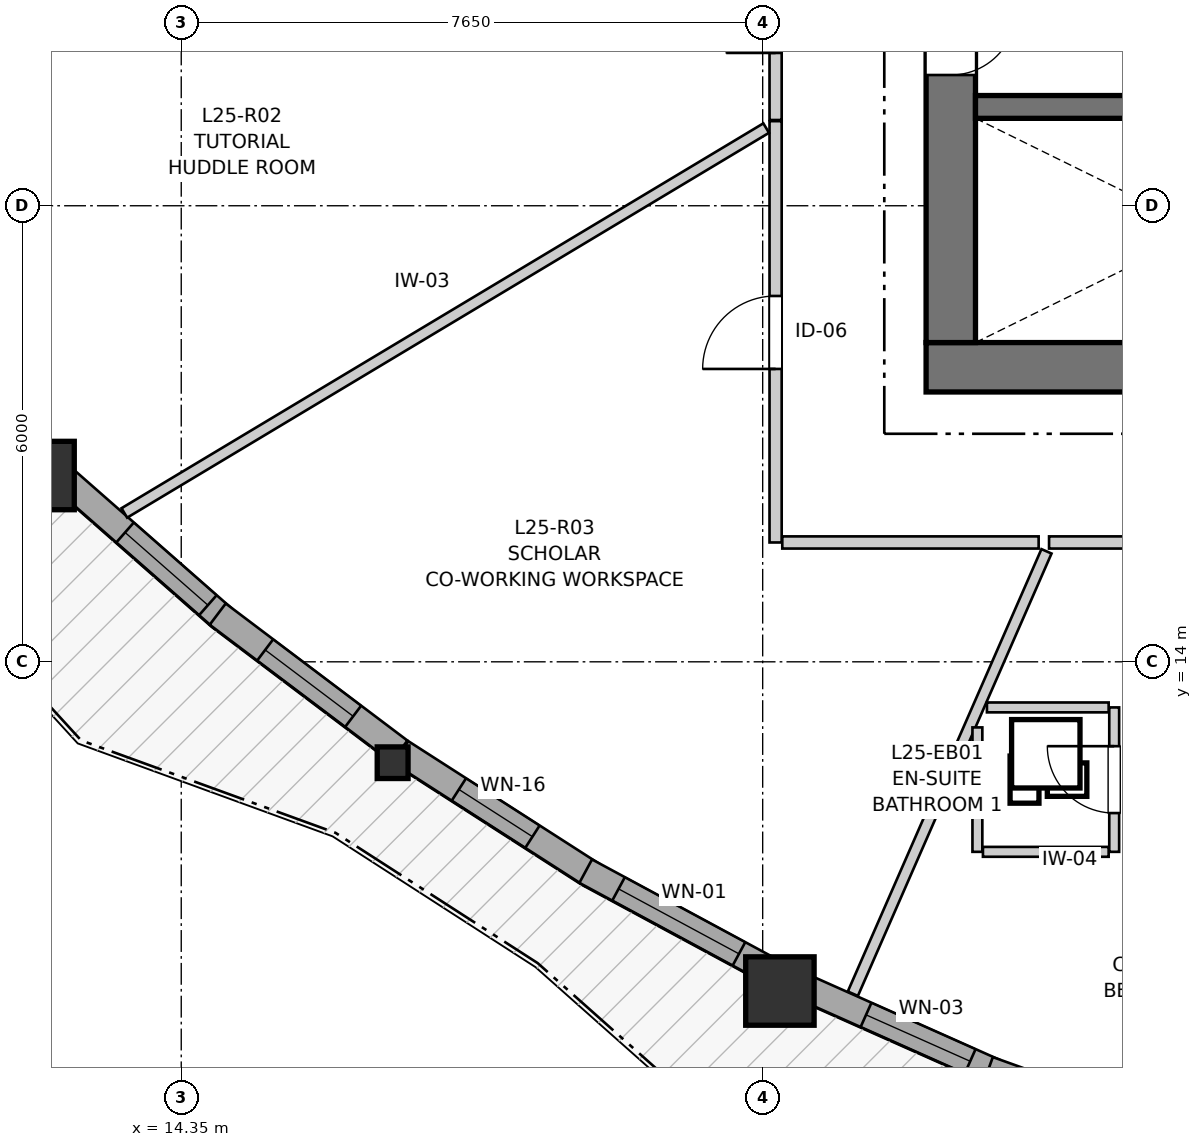
"""IFC4 building model, lengths in metres.
Left out: names, types, materials, properties, quantities, classifications, styles, units other than length and angle.
Written with IfcOpenShell. Run it as: python <this file> out.ifc"""

import sys

from ifc_helpers import new_model, si_unit, direction, frame, frame_2d, origin, origin_2d, place, context, subcontext, project, spatial, rectangle, i_section, extrude, source, transform, mapped, element, fill, save


model = new_model("IFC4")
c1 = context("Model", 3, precision=1e-05, world=origin(), true_north=direction((0.0, 1.0)))
c2 = subcontext(c1, "Body", "Model", "MODEL_VIEW")
j1 = project(units=[si_unit("LENGTHUNIT", "METRE"), si_unit("PLANEANGLEUNIT", "RADIAN")], contexts=[c1])
p1 = place(None, origin())
s1 = spatial("IfcSite", under=j1, at=p1, CompositionType="ELEMENT")
p2 = place(p1, origin())
s2 = spatial("IfcBuilding", under=s1, at=p2, CompositionType="ELEMENT")
p3 = place(p2, frame((0.0, 0.0, 86.4)))
s3 = spatial("IfcBuildingStorey", under=s2, at=p3, CompositionType="ELEMENT", Elevation=86.4)
p4 = place(p3, frame((24.15, 17.875, 0.0), z_axis=(0.0, 0.0, 1.0), x_axis=(1.0, 0.0, 0.0)))
e1 = element("IfcWall", 1, at=p4, inside=s3, PredefinedType="SHEAR", context=c2, shape_type="SweptSolid", body=[
    extrude(rectangle(XDim=12.4, YDim=0.65, at=frame_2d((6.2, 0.0))), origin(), (0.0, 0.0, 1.0), 2.95),
])
p5 = place(p3, frame((24.475, 33.8, 0.0), z_axis=(0.0, 0.0, 1.0), x_axis=(0.0, -1.0, 0.0)))
e2 = element("IfcWall", 2, at=p5, inside=s3, PredefinedType="SHEAR", context=c2, shape_type="SweptSolid", body=[
    extrude(rectangle(XDim=15.6, YDim=0.65, at=frame_2d((7.8, 0.0))), origin(), (0.0, 0.0, 1.0), 2.95),
])
p6 = place(p5, frame((7.05, 0.0, 0.0)))
e3 = element("IfcOpeningElement", 3, at=p6, cuts=e2, PredefinedType="OPENING", context=c2, shape_type="SweptSolid", body=[
    extrude(rectangle(XDim=1.5, YDim=2.15, at=frame_2d((0.75, 1.075))), frame((0.0, 0.335, 0.0), z_axis=(0.0, -1.0, 0.0), x_axis=(1.0, 0.0, 0.0)), (0.0, 0.0, 1.0), 0.67),
])
p7 = place(p5, frame((3.52, 0.0, 0.0)))
e4 = element("IfcOpeningElement", 4, at=p7, cuts=e2, PredefinedType="OPENING", context=c2, shape_type="SweptSolid", body=[
    extrude(rectangle(XDim=0.86, YDim=2.05, at=frame_2d((0.43, 1.025))), frame((0.0, 0.335, 0.0), z_axis=(0.0, -1.0, 0.0), x_axis=(1.0, 0.0, 0.0)), (0.0, 0.0, 1.0), 0.67),
])
p8 = place(p5, frame((11.22, 0.0, 0.0)))
e5 = element("IfcOpeningElement", 5, at=p8, cuts=e2, PredefinedType="OPENING", context=c2, shape_type="SweptSolid", body=[
    extrude(rectangle(XDim=0.86, YDim=2.05, at=frame_2d((0.43, 1.025))), frame((0.0, 0.335, 0.0), z_axis=(0.0, -1.0, 0.0), x_axis=(1.0, 0.0, 0.0)), (0.0, 0.0, 1.0), 0.67),
])
p9 = place(p3, frame((24.8, 21.3, 0.0), z_axis=(0.0, 0.0, 1.0), x_axis=(1.0, 0.0, 0.0)))
e6 = element("IfcWall", 6, at=p9, inside=s3, PredefinedType="SHEAR", context=c2, shape_type="SweptSolid", body=[
    extrude(rectangle(XDim=11.1, YDim=0.3, at=frame_2d((5.55, 0.0))), origin(), (0.0, 0.0, 1.0), 2.95),
])
p10 = place(p9, frame((6.22, 0.0, 0.0)))
e7 = element("IfcOpeningElement", 7, at=p10, cuts=e6, PredefinedType="OPENING", context=c2, shape_type="SweptSolid", body=[
    extrude(rectangle(XDim=0.98, YDim=2.15, at=frame_2d((0.49, 1.075))), frame((0.0, 0.16, 0.0), z_axis=(0.0, -1.0, 0.0), x_axis=(1.0, 0.0, 0.0)), (0.0, 0.0, 1.0), 0.32),
])
p11 = place(p9, frame((9.15, 0.0, 0.0)))
e8 = element("IfcOpeningElement", 8, at=p11, cuts=e6, PredefinedType="OPENING", context=c2, shape_type="SweptSolid", body=[
    extrude(rectangle(XDim=1.15, YDim=2.15, at=frame_2d((0.575, 1.075))), frame((0.0, 0.16, 0.0), z_axis=(0.0, -1.0, 0.0), x_axis=(1.0, 0.0, 0.0)), (0.0, 0.0, 1.0), 0.32),
])
m1 = source(origin(), c2, "Body", "SweptSolid", [
    extrude(rectangle(XDim=0.9, YDim=0.9, at=origin_2d()), origin(), (0.0, 0.0, 1.0), 2.95),
])
p12 = place(p3, frame((12.493, 16.451, 0.0), z_axis=(0.0, 0.0, 1.0), x_axis=(1.0, 0.0, 0.0)))
e9 = element("IfcColumn", 9, at=p12, inside=s3, PredefinedType="COLUMN", context=c2, shape_type="MappedRepresentation", body=[
    mapped(m1, transform((0.0, 0.0, 0.0), x_axis=(1.0, 0.0, 0.0), y_axis=(0.0, 1.0, 0.0), z_axis=(0.0, 0.0, 1.0), scale=1.0)),
])
m2 = source(origin(), c2, "Body", "SweptSolid", [
    extrude(i_section(OverallWidth=0.406, OverallDepth=0.416, WebThickness=0.027, FlangeThickness=0.044, FilletRadius=0.015, at=origin_2d()), origin(), (0.0, 0.0, 1.0), 2.95),
])
p13 = place(p3, frame((17.131, 12.673, 0.0), z_axis=(0.0, 0.0, 1.0), x_axis=(1.0, 0.0, 0.0)))
e10 = element("IfcColumn", 10, at=p13, inside=s3, PredefinedType="PILASTER", context=c2, shape_type="MappedRepresentation", body=[
    mapped(m2, transform((0.0, 0.0, 0.0), x_axis=(1.0, 0.0, 0.0), y_axis=(0.0, 1.0, 0.0), z_axis=(0.0, 0.0, 1.0), scale=1.0)),
])
p14 = place(p3, frame((22.227, 9.669, 0.0), z_axis=(0.0, 0.0, 1.0), x_axis=(1.0, 0.0, 0.0)))
e11 = element("IfcColumn", 11, at=p14, inside=s3, PredefinedType="COLUMN", context=c2, shape_type="MappedRepresentation", body=[
    mapped(m1, transform((0.0, 0.0, 0.0), x_axis=(1.0, 0.0, 0.0), y_axis=(0.0, 1.0, 0.0), z_axis=(0.0, 0.0, 1.0), scale=1.0)),
])
p15 = place(p3, frame((12.777, 16.434, 0.0), z_axis=(0.0, 0.0, 1.0), x_axis=(0.751531192513, -0.659697556976, 0.0)))
e12 = element("IfcWall", 12, at=p15, inside=s3, PredefinedType="SOLIDWALL", context=c2, shape_type="SweptSolid", body=[
    extrude(rectangle(XDim=2.823, YDim=0.35, at=frame_2d((1.412, 0.0))), origin(), (0.0, 0.0, 1.0), 2.48),
])
p16 = place(p15, frame((1.11, 0.0, 0.82)))
e13 = element("IfcOpeningElement", 13, at=p16, cuts=e12, PredefinedType="OPENING", context=c2, shape_type="SweptSolid", body=[
    extrude(rectangle(XDim=1.45, YDim=1.25, at=frame_2d((0.725, 0.625))), frame((0.0, 0.185, 0.0), z_axis=(0.0, -1.0, 0.0), x_axis=(1.0, 0.0, 0.0)), (0.0, 0.0, 1.0), 0.37),
])
p17 = place(p3, frame((14.83, 14.627, 0.0), z_axis=(0.0, 0.0, 1.0), x_axis=(0.798382892471, -0.602150111691, 0.0)))
e14 = element("IfcWall", 14, at=p17, inside=s3, PredefinedType="SOLIDWALL", context=c2, shape_type="SweptSolid", body=[
    extrude(rectangle(XDim=2.995, YDim=0.35, at=frame_2d((1.497, 0.0))), origin(), (0.0, 0.0, 1.0), 2.48),
])
p18 = place(p17, frame((0.782, 0.0, 0.82)))
e15 = element("IfcOpeningElement", 15, at=p18, cuts=e14, PredefinedType="OPENING", context=c2, shape_type="SweptSolid", body=[
    extrude(rectangle(XDim=1.45, YDim=1.25, at=frame_2d((0.725, 0.625))), frame((0.0, 0.185, 0.0), z_axis=(0.0, -1.0, 0.0), x_axis=(1.0, 0.0, 0.0)), (0.0, 0.0, 1.0), 0.37),
])
p19 = place(p3, frame((17.243, 12.809, 0.0), z_axis=(0.0, 0.0, 1.0), x_axis=(0.84150067635, -0.540256061236, 0.0)))
e16 = element("IfcWall", 16, at=p19, inside=s3, PredefinedType="SOLIDWALL", context=c2, shape_type="SweptSolid", body=[
    extrude(rectangle(XDim=2.978, YDim=0.35, at=frame_2d((1.489, 0.0))), origin(), (0.0, 0.0, 1.0), 2.48),
])
p20 = place(p19, frame((0.904, 0.0, 0.82)))
e17 = element("IfcOpeningElement", 17, at=p20, cuts=e16, PredefinedType="OPENING", context=c2, shape_type="SweptSolid", body=[
    extrude(rectangle(XDim=1.15, YDim=1.2, at=frame_2d((0.575, 0.6))), frame((0.0, 0.185, 0.0), z_axis=(0.0, -1.0, 0.0), x_axis=(1.0, 0.0, 0.0)), (0.0, 0.0, 1.0), 0.37),
])
p21 = place(p3, frame((19.671, 11.246, 0.0), z_axis=(0.0, 0.0, 1.0), x_axis=(0.880120285763, -0.474750758387, 0.0)))
e18 = element("IfcWall", 18, at=p21, inside=s3, PredefinedType="SOLIDWALL", context=c2, shape_type="SweptSolid", body=[
    extrude(rectangle(XDim=2.773, YDim=0.35, at=frame_2d((1.386, 0.0))), origin(), (0.0, 0.0, 1.0), 2.48),
])
p22 = place(p21, frame((0.491, 0.0, 0.82)))
e19 = element("IfcOpeningElement", 19, at=p22, cuts=e18, PredefinedType="OPENING", context=c2, shape_type="SweptSolid", body=[
    extrude(rectangle(XDim=1.8, YDim=1.45, at=frame_2d((0.9, 0.725))), frame((0.0, 0.185, 0.0), z_axis=(0.0, -1.0, 0.0), x_axis=(1.0, 0.0, 0.0)), (0.0, 0.0, 1.0), 0.37),
])
p23 = place(p3, frame((22.503, 9.737, 0.0), z_axis=(0.0, 0.0, 1.0), x_axis=(0.913443049169, -0.406966578388, 0.0)))
e20 = element("IfcWall", 20, at=p23, inside=s3, PredefinedType="SOLIDWALL", context=c2, shape_type="SweptSolid", body=[
    extrude(rectangle(XDim=2.79, YDim=0.35, at=frame_2d((1.395, 0.0))), origin(), (0.0, 0.0, 1.0), 2.48),
])
p24 = place(p23, frame((0.938, 0.0, 0.82)))
e21 = element("IfcOpeningElement", 21, at=p24, cuts=e20, PredefinedType="OPENING", context=c2, shape_type="SweptSolid", body=[
    extrude(rectangle(XDim=1.5, YDim=1.45, at=frame_2d((0.75, 0.725))), frame((0.0, 0.185, 0.0), z_axis=(0.0, -1.0, 0.0), x_axis=(1.0, 0.0, 0.0)), (0.0, 0.0, 1.0), 0.37),
])
p25 = place(p3, frame((24.969, 8.635, 0.0), z_axis=(0.0, 0.0, 1.0), x_axis=(0.941099972293, -0.338128440315, 0.0)))
e22 = element("IfcWall", 22, at=p25, inside=s3, PredefinedType="SOLIDWALL", context=c2, shape_type="SweptSolid", body=[
    extrude(rectangle(XDim=3.028, YDim=0.35, at=frame_2d((1.514, 0.0))), origin(), (0.0, 0.0, 1.0), 2.48),
])
p26 = place(p25, frame((0.774, 0.0, 0.82)))
e23 = element("IfcOpeningElement", 23, at=p26, cuts=e22, PredefinedType="OPENING", context=c2, shape_type="SweptSolid", body=[
    extrude(rectangle(XDim=1.5, YDim=1.45, at=frame_2d((0.75, 0.725))), frame((0.0, 0.185, 0.0), z_axis=(0.0, -1.0, 0.0), x_axis=(1.0, 0.0, 0.0)), (0.0, 0.0, 1.0), 0.37),
])
p27 = place(p3, frame((22.17, 15.57, 0.0), z_axis=(0.0, 0.0, 1.0), x_axis=(0.0, 1.0, 0.0)))
e24 = element("IfcWall", 24, at=p27, inside=s3, PredefinedType="PARTITIONING", context=c2, shape_type="SweptSolid", body=[
    extrude(rectangle(XDim=5.543, YDim=0.16, at=frame_2d((2.771, 0.0))), origin(), (0.0, 0.0, 1.0), 2.95),
])
p28 = place(p27, frame((2.283, 0.0, 0.0)))
e25 = element("IfcOpeningElement", 25, at=p28, cuts=e24, PredefinedType="OPENING", context=c2, shape_type="SweptSolid", body=[
    extrude(rectangle(XDim=0.96, YDim=2.1, at=frame_2d((0.48, 1.05))), frame((0.0, 0.09, 0.0), z_axis=(0.0, -1.0, 0.0), x_axis=(1.0, 0.0, 0.0)), (0.0, 0.0, 1.0), 0.18),
])
p29 = place(p3, frame((29.438, 15.57, 0.0), z_axis=(0.0, 0.0, 1.0), x_axis=(-1.0, 0.0, 0.0)))
e26 = element("IfcWall", 26, at=p29, inside=s3, PredefinedType="PARTITIONING", context=c2, shape_type="SweptSolid", body=[
    extrude(rectangle(XDim=3.67, YDim=0.16, at=frame_2d((1.835, 0.0))), origin(), (0.0, 0.0, 1.0), 2.95),
])
p30 = place(p29, frame((1.374, 0.0, 0.0)))
e27 = element("IfcOpeningElement", 27, at=p30, cuts=e26, PredefinedType="OPENING", context=c2, shape_type="SweptSolid", body=[
    extrude(rectangle(XDim=0.92, YDim=2.1, at=frame_2d((0.46, 1.05))), frame((0.0, 0.09, 0.0), z_axis=(0.0, -1.0, 0.0), x_axis=(1.0, 0.0, 0.0)), (0.0, 0.0, 1.0), 0.18),
])
p31 = place(p3, frame((22.17, 21.128, 0.0), z_axis=(0.0, 0.0, 1.0), x_axis=(0.0, 1.0, 0.0)))
e28 = element("IfcWall", 28, at=p31, inside=s3, PredefinedType="PARTITIONING", context=c2, shape_type="SweptSolid", body=[
    extrude(rectangle(XDim=3.022, YDim=0.16, at=frame_2d((1.511, 0.0))), origin(), (0.0, 0.0, 1.0), 2.95),
])
p32 = place(p31, frame((0.883, 0.0, 0.0)))
e29 = element("IfcOpeningElement", 29, at=p32, cuts=e28, PredefinedType="OPENING", context=c2, shape_type="SweptSolid", body=[
    extrude(rectangle(XDim=1.3, YDim=2.1, at=frame_2d((0.65, 1.05))), frame((0.0, 0.09, 0.0), z_axis=(0.0, -1.0, 0.0), x_axis=(1.0, 0.0, 0.0)), (0.0, 0.0, 1.0), 0.18),
])
p33 = place(p3, frame((26.625, 11.5, 0.0), z_axis=(0.0, 0.0, 1.0), x_axis=(0.0, 1.0, 0.0)))
e30 = element("IfcWall", 30, at=p33, inside=s3, PredefinedType="PARTITIONING", context=c2, shape_type="SweptSolid", body=[
    extrude(rectangle(XDim=1.9, YDim=0.13, at=frame_2d((0.95, 0.0))), origin(), (0.0, 0.0, 1.0), 2.95),
])
p34 = place(p33, frame((0.51, 0.0, 0.0)))
e31 = element("IfcOpeningElement", 31, at=p34, cuts=e30, PredefinedType="OPENING", context=c2, shape_type="SweptSolid", body=[
    extrude(rectangle(XDim=0.88, YDim=2.05, at=frame_2d((0.44, 1.025))), frame((0.0, 0.075, 0.0), z_axis=(0.0, -1.0, 0.0), x_axis=(1.0, 0.0, 0.0)), (0.0, 0.0, 1.0), 0.15),
])
p35 = place(p3, frame((13.601, 15.958, 0.0), z_axis=(0.0, 0.0, 1.0), x_axis=(0.857661345212, 0.514214952066, 0.0)))
e32 = element("IfcWall", 32, at=p35, inside=s3, PredefinedType="PARTITIONING", context=c2, shape_type="SweptSolid", body=[
    extrude(rectangle(XDim=9.846, YDim=0.145, at=frame_2d((4.923, 0.0))), origin(), (0.0, 0.0, 1.0), 2.95),
])
p36 = place(p3, frame((23.186, 9.634, 0.0), z_axis=(0.0, 0.0, 1.0), x_axis=(0.400994208685, 0.916080588486, 0.0)))
e33 = element("IfcWall", 33, at=p36, inside=s3, PredefinedType="PARTITIONING", context=c2, shape_type="SweptSolid", body=[
    extrude(rectangle(XDim=6.353, YDim=0.145, at=frame_2d((3.177, 0.0))), origin(), (0.0, 0.0, 1.0), 2.95),
])
p37 = place(p3, frame((22.258, 15.57, 0.0), z_axis=(0.0, 0.0, 1.0), x_axis=(1.0, 0.0, 0.0)))
e34 = element("IfcWall", 34, at=p37, inside=s3, PredefinedType="PARTITIONING", context=c2, shape_type="SweptSolid", body=[
    extrude(rectangle(XDim=3.373, YDim=0.16, at=frame_2d((1.687, 0.0))), origin(), (0.0, 0.0, 1.0), 2.95),
])
p38 = place(p3, frame((24.825, 11.5, 0.0), z_axis=(0.0, 0.0, 1.0), x_axis=(0.0, 1.0, 0.0)))
e35 = element("IfcWall", 35, at=p38, inside=s3, PredefinedType="PARTITIONING", context=c2, shape_type="SweptSolid", body=[
    extrude(rectangle(XDim=1.637, YDim=0.13, at=frame_2d((0.818, 0.0))), origin(), (0.0, 0.0, 1.0), 2.95),
])
p39 = place(p3, frame((24.898, 11.5, 0.0), z_axis=(0.0, 0.0, 1.0), x_axis=(1.0, 0.0, 0.0)))
e36 = element("IfcWall", 36, at=p39, inside=s3, PredefinedType="PARTITIONING", context=c2, shape_type="SweptSolid", body=[
    extrude(rectangle(XDim=1.654, YDim=0.13, at=frame_2d((0.827, 0.0))), origin(), (0.0, 0.0, 1.0), 2.558),
])
p40 = place(p3, frame((24.951, 13.4, 0.0), z_axis=(0.0, 0.0, 1.0), x_axis=(1.0, 0.0, 0.0)))
e37 = element("IfcWall", 37, at=p40, inside=s3, PredefinedType="PARTITIONING", context=c2, shape_type="SweptSolid", body=[
    extrude(rectangle(XDim=1.601, YDim=0.13, at=frame_2d((0.801, 0.0))), origin(), (0.0, 0.0, 1.0), 2.95),
])
m3 = source(origin(), c2, "Body", "SweptSolid", [
    extrude(rectangle(XDim=1.45, YDim=1.25, at=frame_2d((0.725, 0.625))), frame((0.0, 0.03, 0.0), z_axis=(0.0, -1.0, 0.0), x_axis=(1.0, 0.0, 0.0)), (0.0, 0.0, 1.0), 0.06),
])
p41 = place(p16, origin())
e38 = element("IfcWindow", 38, at=p41, inside=s3, PartitioningType="SINGLE_PANEL", PredefinedType="WINDOW", context=c2, shape_type="MappedRepresentation", body=[
    mapped(m3, transform((0.0, 0.0, 0.0), x_axis=(1.0, 0.0, 0.0), y_axis=(0.0, 1.0, 0.0), z_axis=(0.0, 0.0, 1.0), scale=1.0)),
])
fill(e13, e38)
p42 = place(p18, origin())
e39 = element("IfcWindow", 39, at=p42, inside=s3, PartitioningType="SINGLE_PANEL", PredefinedType="WINDOW", context=c2, shape_type="MappedRepresentation", body=[
    mapped(m3, transform((0.0, 0.0, 0.0), x_axis=(1.0, 0.0, 0.0), y_axis=(0.0, 1.0, 0.0), z_axis=(0.0, 0.0, 1.0), scale=1.0)),
])
fill(e15, e39)
m4 = source(origin(), c2, "Body", "SweptSolid", [
    extrude(rectangle(XDim=1.15, YDim=1.2, at=frame_2d((0.575, 0.6))), frame((0.0, 0.03, 0.0), z_axis=(0.0, -1.0, 0.0), x_axis=(1.0, 0.0, 0.0)), (0.0, 0.0, 1.0), 0.06),
])
p43 = place(p20, origin())
e40 = element("IfcWindow", 40, at=p43, inside=s3, PartitioningType="SINGLE_PANEL", PredefinedType="WINDOW", context=c2, shape_type="MappedRepresentation", body=[
    mapped(m4, transform((0.0, 0.0, 0.0), x_axis=(1.0, 0.0, 0.0), y_axis=(0.0, 1.0, 0.0), z_axis=(0.0, 0.0, 1.0), scale=1.0)),
])
fill(e17, e40)
m5 = source(origin(), c2, "Body", "SweptSolid", [
    extrude(rectangle(XDim=1.8, YDim=1.45, at=frame_2d((0.9, 0.725))), frame((0.0, 0.03, 0.0), z_axis=(0.0, -1.0, 0.0), x_axis=(1.0, 0.0, 0.0)), (0.0, 0.0, 1.0), 0.06),
])
p44 = place(p22, origin())
e41 = element("IfcWindow", 41, at=p44, inside=s3, PartitioningType="SINGLE_PANEL", PredefinedType="WINDOW", context=c2, shape_type="MappedRepresentation", body=[
    mapped(m5, transform((0.0, 0.0, 0.0), x_axis=(1.0, 0.0, 0.0), y_axis=(0.0, 1.0, 0.0), z_axis=(0.0, 0.0, 1.0), scale=1.0)),
])
fill(e19, e41)
m6 = source(origin(), c2, "Body", "SweptSolid", [
    extrude(rectangle(XDim=1.5, YDim=1.45, at=frame_2d((0.75, 0.725))), frame((0.0, 0.03, 0.0), z_axis=(0.0, -1.0, 0.0), x_axis=(1.0, 0.0, 0.0)), (0.0, 0.0, 1.0), 0.06),
])
p45 = place(p24, origin())
e42 = element("IfcWindow", 42, at=p45, inside=s3, PartitioningType="SINGLE_PANEL", PredefinedType="WINDOW", context=c2, shape_type="MappedRepresentation", body=[
    mapped(m6, transform((0.0, 0.0, 0.0), x_axis=(1.0, 0.0, 0.0), y_axis=(0.0, 1.0, 0.0), z_axis=(0.0, 0.0, 1.0), scale=1.0)),
])
fill(e21, e42)
m7 = source(origin(), c2, "Body", "SweptSolid", [
    extrude(rectangle(XDim=0.86, YDim=2.05, at=frame_2d((0.43, 1.025))), frame((0.0, 0.025, 0.0), z_axis=(0.0, -1.0, 0.0), x_axis=(1.0, 0.0, 0.0)), (0.0, 0.0, 1.0), 0.05),
])
p46 = place(p8, origin())
e43 = element("IfcDoor", 43, at=p46, inside=s3, OperationType="SINGLE_SWING_LEFT", PredefinedType="DOOR", context=c2, shape_type="MappedRepresentation", body=[
    mapped(m7, transform((0.0, 0.0, 0.0), x_axis=(1.0, 0.0, 0.0), y_axis=(0.0, 1.0, 0.0), z_axis=(0.0, 0.0, 1.0), scale=1.0)),
])
fill(e5, e43)
m8 = source(origin(), c2, "Body", "SweptSolid", [
    extrude(rectangle(XDim=0.96, YDim=2.1, at=frame_2d((0.48, 1.05))), frame((0.0, 0.025, 0.0), z_axis=(0.0, -1.0, 0.0), x_axis=(1.0, 0.0, 0.0)), (0.0, 0.0, 1.0), 0.05),
])
p47 = place(p28, origin())
e44 = element("IfcDoor", 44, at=p47, inside=s3, OperationType="SINGLE_SWING_LEFT", PredefinedType="DOOR", context=c2, shape_type="MappedRepresentation", body=[
    mapped(m8, transform((0.0, 0.0, 0.0), x_axis=(1.0, 0.0, 0.0), y_axis=(0.0, 1.0, 0.0), z_axis=(0.0, 0.0, 1.0), scale=1.0)),
])
fill(e25, e44)
m9 = source(origin(), c2, "Body", "SweptSolid", [
    extrude(rectangle(XDim=1.3, YDim=2.1, at=frame_2d((0.65, 1.05))), frame((0.0, 0.025, 0.0), z_axis=(0.0, -1.0, 0.0), x_axis=(1.0, 0.0, 0.0)), (0.0, 0.0, 1.0), 0.05),
])
p48 = place(p32, origin())
e45 = element("IfcDoor", 45, at=p48, inside=s3, OperationType="DOUBLE_DOOR_SINGLE_SWING", PredefinedType="DOOR", context=c2, shape_type="MappedRepresentation", body=[
    mapped(m9, transform((0.0, 0.0, 0.0), x_axis=(1.0, 0.0, 0.0), y_axis=(0.0, 1.0, 0.0), z_axis=(0.0, 0.0, 1.0), scale=1.0)),
])
fill(e29, e45)
m10 = source(origin(), c2, "Body", "SweptSolid", [
    extrude(rectangle(XDim=0.88, YDim=2.05, at=frame_2d((0.44, 1.025))), frame((0.0, 0.025, 0.0), z_axis=(0.0, -1.0, 0.0), x_axis=(1.0, 0.0, 0.0)), (0.0, 0.0, 1.0), 0.05),
])
p49 = place(p34, origin())
e46 = element("IfcDoor", 46, at=p49, inside=s3, OperationType="SINGLE_SWING_RIGHT", PredefinedType="DOOR", context=c2, shape_type="MappedRepresentation", body=[
    mapped(m10, transform((0.0, 0.0, 0.0), x_axis=(1.0, 0.0, 0.0), y_axis=(0.0, 1.0, 0.0), z_axis=(0.0, 0.0, 1.0), scale=1.0)),
])
fill(e31, e46)
save(model, sys.argv[1])
